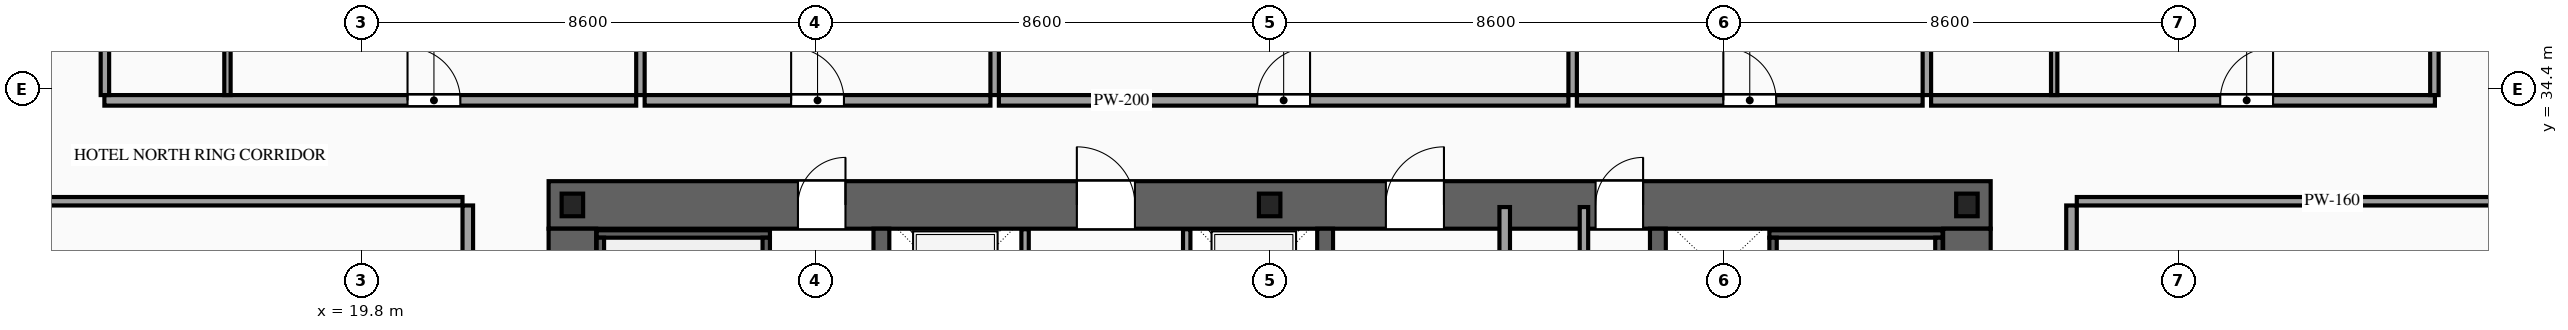
"""IFC4 building model, lengths in metres.
Left out: names, types, materials, properties, quantities, classifications, styles, units other than length and angle.
Written with IfcOpenShell. Run it as: python <this file> out.ifc"""

import sys

from ifc_helpers import new_model, si_unit, direction, frame, frame_2d, origin, origin_2d, place, context, subcontext, project, spatial, rectangle, i_section, extrude, source, transform, mapped, element, fill, save


model = new_model("IFC4")
c1 = context("Model", 3, precision=1e-05, world=origin(), true_north=direction((0.0, 1.0)))
c2 = subcontext(c1, "Body", "Model", "MODEL_VIEW")
j1 = project(units=[si_unit("LENGTHUNIT", "METRE"), si_unit("PLANEANGLEUNIT", "RADIAN")], contexts=[c1])
p1 = place(None, origin())
s1 = spatial("IfcSite", under=j1, at=p1, CompositionType="ELEMENT")
p2 = place(p1, origin())
s2 = spatial("IfcBuilding", under=s1, at=p2, CompositionType="ELEMENT")
p3 = place(p2, frame((0.0, 0.0, 60.4)))
s3 = spatial("IfcBuildingStorey", under=s2, at=p3, CompositionType="ELEMENT", Elevation=60.4)
p4 = place(p3, frame((23.35, 32.2, 0.0), z_axis=(0.0, 0.0, 1.0), x_axis=(1.0, 0.0, 0.0)))
e1 = element("IfcWall", 1, at=p4, inside=s3, PredefinedType="SHEAR", context=c2, shape_type="SweptSolid", body=[
    extrude(rectangle(XDim=27.3, YDim=0.9, at=frame_2d((13.65, 0.0))), origin(), (0.0, 0.0, 1.0), 3.6),
])
p5 = place(p4, frame((4.72, 0.0, 0.0)))
e2 = element("IfcOpeningElement", 2, at=p5, cuts=e1, PredefinedType="OPENING", context=c2, shape_type="SweptSolid", body=[
    extrude(rectangle(XDim=0.9, YDim=2.15, at=frame_2d((0.45, 1.075))), frame((0.0, 0.465, 0.0), z_axis=(0.0, -1.0, 0.0), x_axis=(1.0, 0.0, 0.0)), (0.0, 0.0, 1.0), 0.93),
])
p6 = place(p4, frame((10.0, 0.0, 0.0)))
e3 = element("IfcOpeningElement", 3, at=p6, cuts=e1, PredefinedType="OPENING", context=c2, shape_type="SweptSolid", body=[
    extrude(rectangle(XDim=1.1, YDim=2.2, at=frame_2d((0.55, 1.1))), frame((0.0, 0.465, 0.0), z_axis=(0.0, -1.0, 0.0), x_axis=(1.0, 0.0, 0.0)), (0.0, 0.0, 1.0), 0.93),
])
p7 = place(p4, frame((15.85, 0.0, 0.0)))
e4 = element("IfcOpeningElement", 4, at=p7, cuts=e1, PredefinedType="OPENING", context=c2, shape_type="SweptSolid", body=[
    extrude(rectangle(XDim=1.1, YDim=2.2, at=frame_2d((0.55, 1.1))), frame((0.0, 0.465, 0.0), z_axis=(0.0, -1.0, 0.0), x_axis=(1.0, 0.0, 0.0)), (0.0, 0.0, 1.0), 0.93),
])
p8 = place(p4, frame((19.82, 0.0, 0.0)))
e5 = element("IfcOpeningElement", 5, at=p8, cuts=e1, PredefinedType="OPENING", context=c2, shape_type="SweptSolid", body=[
    extrude(rectangle(XDim=0.9, YDim=2.15, at=frame_2d((0.45, 1.075))), frame((0.0, 0.465, 0.0), z_axis=(0.0, -1.0, 0.0), x_axis=(1.0, 0.0, 0.0)), (0.0, 0.0, 1.0), 0.93),
])
m1 = source(origin(), c2, "Body", "SweptSolid", [
    extrude(rectangle(XDim=11.9, YDim=0.9, at=frame_2d((5.95, 0.0))), origin(), (0.0, 0.0, 1.0), 3.6),
])
for number, where, z_axis, x_axis in (
    (6, (23.8, 19.85, 0.0), (0.0, 0.0, 1.0), (0.0, 1.0, 0.0)),
    (7, (50.2, 19.85, 0.0), (0.0, 0.0, 1.0), (0.0, 1.0, 0.0)),
):
    element("IfcWall", number, at=place(p3, frame(where, z_axis=z_axis, x_axis=x_axis)), inside=s3, PredefinedType="SHEAR", context=c2, shape_type="MappedRepresentation", body=[
        mapped(m1, transform((0.0, 0.0, 0.0), scale=1.0)),
    ])
m2 = source(origin(), c2, "Body", "SweptSolid", [
    extrude(rectangle(XDim=11.9, YDim=0.3, at=frame_2d((5.95, 0.0))), origin(), (0.0, 0.0, 1.0), 3.6),
])
for number, where, z_axis, x_axis in (
    (8, (29.65, 19.85, 0.0), (0.0, 0.0, 1.0), (0.0, 1.0, 0.0)),
    (9, (38.05, 19.85, 0.0), (0.0, 0.0, 1.0), (0.0, 1.0, 0.0)),
    (10, (44.35, 19.85, 0.0), (0.0, 0.0, 1.0), (0.0, 1.0, 0.0)),
):
    element("IfcWall", number, at=place(p3, frame(where, z_axis=z_axis, x_axis=x_axis)), inside=s3, PredefinedType="SOLIDWALL", context=c2, shape_type="MappedRepresentation", body=[
        mapped(m2, transform((0.0, 0.0, 0.0), scale=1.0)),
    ])
m3 = source(origin(), c2, "Body", "SweptSolid", [
    extrude(i_section(OverallWidth=0.407, OverallDepth=0.428, WebThickness=0.02, FlangeThickness=0.035, at=origin_2d()), origin(), (0.0, 0.0, 1.0), 3.6),
])
for number, where, z_axis, x_axis in (
    (11, (23.8, 32.2, 0.0), (0.0, 0.0, 1.0), (1.0, 0.0, 0.0)),
    (12, (37.0, 32.2, 0.0), (0.0, 0.0, 1.0), (1.0, 0.0, 0.0)),
    (13, (50.2, 32.2, 0.0), (0.0, 0.0, 1.0), (1.0, 0.0, 0.0)),
):
    element("IfcColumn", number, at=place(p3, frame(where, z_axis=z_axis, x_axis=x_axis)), inside=s3, PredefinedType="COLUMN", context=c2, shape_type="MappedRepresentation", body=[
        mapped(m3, transform((0.0, 0.0, 0.0), scale=1.0)),
    ])
p9 = place(p3, frame((32.37, 29.4, 0.0), z_axis=(0.0, 0.0, 1.0), x_axis=(0.0, 1.0, 0.0)))
e14 = element("IfcWall", 14, at=p9, inside=s3, PredefinedType="SOLIDWALL", context=c2, shape_type="SweptSolid", body=[
    extrude(rectangle(XDim=2.34, YDim=0.14, at=frame_2d((1.17, 0.0))), origin(), (0.0, 0.0, 1.0), 3.38),
])
p10 = place(p9, frame((0.62, 0.0, 0.0)))
e15 = element("IfcOpeningElement", 15, at=p10, cuts=e14, PredefinedType="OPENING", context=c2, shape_type="SweptSolid", body=[
    extrude(rectangle(XDim=1.1, YDim=2.2, at=frame_2d((0.55, 1.1))), frame((0.0, 0.085, 0.0), z_axis=(0.0, -1.0, 0.0), x_axis=(1.0, 0.0, 0.0)), (0.0, 0.0, 1.0), 0.17),
])
p11 = place(p3, frame((35.43, 29.4, 0.0), z_axis=(0.0, 0.0, 1.0), x_axis=(0.0, 1.0, 0.0)))
e16 = element("IfcWall", 16, at=p11, inside=s3, PredefinedType="SOLIDWALL", context=c2, shape_type="SweptSolid", body=[
    extrude(rectangle(XDim=2.34, YDim=0.14, at=frame_2d((1.17, 0.0))), origin(), (0.0, 0.0, 1.0), 3.38),
])
p12 = place(p11, frame((0.62, 0.0, 0.0)))
e17 = element("IfcOpeningElement", 17, at=p12, cuts=e16, PredefinedType="OPENING", context=c2, shape_type="SweptSolid", body=[
    extrude(rectangle(XDim=1.1, YDim=2.2, at=frame_2d((0.55, 1.1))), frame((0.0, 0.085, 0.0), z_axis=(0.0, -1.0, 0.0), x_axis=(1.0, 0.0, 0.0)), (0.0, 0.0, 1.0), 0.17),
])
m4 = source(origin(), c2, "Body", "SweptSolid", [
    extrude(rectangle(XDim=3.28, YDim=0.14, at=frame_2d((1.64, 0.0))), origin(), (0.0, 0.0, 1.0), 3.38),
])
p13 = place(p3, frame((24.26, 31.65, 0.0), z_axis=(0.0, 0.0, 1.0), x_axis=(1.0, 0.0, 0.0)))
e18 = element("IfcWall", 18, at=p13, inside=s3, PredefinedType="SOLIDWALL", context=c2, shape_type="MappedRepresentation", body=[
    mapped(m4, transform((0.0, 0.0, 0.0), scale=1.0)),
])
m5 = source(origin(), c2, "Body", "SweptSolid", [
    extrude(rectangle(XDim=8.94, YDim=0.14, at=frame_2d((4.47, 0.0))), origin(), (0.0, 0.0, 1.0), 3.38),
])
for number, where, z_axis, x_axis in (
    (19, (24.33, 22.64, 0.0), (0.0, 0.0, 1.0), (0.0, 1.0, 0.0)),
    (20, (27.47, 22.64, 0.0), (0.0, 0.0, 1.0), (0.0, 1.0, 0.0)),
):
    element("IfcWall", number, at=place(p3, frame(where, z_axis=z_axis, x_axis=x_axis)), inside=s3, PredefinedType="SOLIDWALL", context=c2, shape_type="MappedRepresentation", body=[
        mapped(m5, transform((0.0, 0.0, 0.0), scale=1.0)),
    ])
p14 = place(p3, frame((46.46, 31.65, 0.0), z_axis=(0.0, 0.0, 1.0), x_axis=(1.0, 0.0, 0.0)))
e21 = element("IfcWall", 21, at=p14, inside=s3, PredefinedType="SOLIDWALL", context=c2, shape_type="MappedRepresentation", body=[
    mapped(m4, transform((0.0, 0.0, 0.0), scale=1.0)),
])
for number, where, z_axis, x_axis in (
    (22, (46.53, 22.64, 0.0), (0.0, 0.0, 1.0), (0.0, 1.0, 0.0)),
    (23, (49.67, 22.64, 0.0), (0.0, 0.0, 1.0), (0.0, 1.0, 0.0)),
):
    element("IfcWall", number, at=place(p3, frame(where, z_axis=z_axis, x_axis=x_axis)), inside=s3, PredefinedType="SOLIDWALL", context=c2, shape_type="MappedRepresentation", body=[
        mapped(m5, transform((0.0, 0.0, 0.0), scale=1.0)),
    ])
m6 = source(origin(), c2, "Body", "SweptSolid", [
    extrude(rectangle(XDim=12.72, YDim=0.2, at=frame_2d((6.36, 0.0))), origin(), (0.0, 0.0, 1.0), 3.38),
])
p15 = place(p3, frame((41.45, 19.44, 0.0), z_axis=(0.0, 0.0, 1.0), x_axis=(0.0, 1.0, 0.0)))
e24 = element("IfcWall", 24, at=p15, inside=s3, PredefinedType="PARTITIONING", context=c2, shape_type="MappedRepresentation", body=[
    mapped(m6, transform((0.0, 0.0, 0.0), scale=1.0)),
])
m7 = source(origin(), c2, "Body", "SweptSolid", [
    extrude(rectangle(XDim=10.72, YDim=0.16, at=frame_2d((5.36, 0.0))), origin(), (0.0, 0.0, 1.0), 3.38),
])
p16 = place(p3, frame((42.95, 21.44, 0.0), z_axis=(0.0, 0.0, 1.0), x_axis=(0.0, 1.0, 0.0)))
e25 = element("IfcWall", 25, at=p16, inside=s3, PredefinedType="PARTITIONING", context=c2, shape_type="MappedRepresentation", body=[
    mapped(m7, transform((0.0, 0.0, 0.0), scale=1.0)),
])
p17 = place(p3, frame((14.94, 34.18, 0.0), z_axis=(0.0, 0.0, 1.0), x_axis=(1.0, 0.0, 0.0)))
e26 = element("IfcWall", 26, at=p17, inside=s3, PredefinedType="PARTITIONING", context=c2, shape_type="SweptSolid", body=[
    extrude(rectangle(XDim=10.068, YDim=0.2, at=frame_2d((5.034, 0.0))), origin(), (0.0, 0.0, 1.0), 3.38),
])
p18 = place(p17, frame((5.739, 0.0, 0.0)))
e27 = element("IfcOpeningElement", 27, at=p18, cuts=e26, PredefinedType="OPENING", context=c2, shape_type="SweptSolid", body=[
    extrude(rectangle(XDim=1.0, YDim=2.2, at=frame_2d((0.5, 1.1))), frame((0.0, 0.115, 0.0), z_axis=(0.0, -1.0, 0.0), x_axis=(1.0, 0.0, 0.0)), (0.0, 0.0, 1.0), 0.23),
])
m8 = source(origin(), c2, "Body", "SweptSolid", [
    extrude(rectangle(XDim=16.47, YDim=0.16, at=frame_2d((8.235, 0.0))), origin(), (0.0, 0.0, 1.0), 3.38),
])
p19 = place(p3, frame((25.088, 34.28, 0.0), z_axis=(0.0, 0.0, 1.0), x_axis=(0.0, 1.0, 0.0)))
e28 = element("IfcWall", 28, at=p19, inside=s3, PredefinedType="PARTITIONING", context=c2, shape_type="MappedRepresentation", body=[
    mapped(m8, transform((0.0, 0.0, 0.0), scale=1.0)),
])
m9 = source(origin(), c2, "Body", "SweptSolid", [
    extrude(rectangle(XDim=2.42, YDim=0.12, at=frame_2d((1.21, 0.0))), origin(), (0.0, 0.0, 1.0), 3.38),
])
p20 = place(p3, frame((17.27, 34.28, 0.0), z_axis=(0.0, 0.0, 1.0), x_axis=(0.0, 1.0, 0.0)))
e29 = element("IfcWall", 29, at=p20, inside=s3, PredefinedType="PARTITIONING", context=c2, shape_type="MappedRepresentation", body=[
    mapped(m9, transform((0.0, 0.0, 0.0), scale=1.0)),
])
p21 = place(p3, frame((25.168, 34.18, 0.0), z_axis=(0.0, 0.0, 1.0), x_axis=(1.0, 0.0, 0.0)))
e30 = element("IfcWall", 30, at=p21, inside=s3, PredefinedType="PARTITIONING", context=c2, shape_type="SweptSolid", body=[
    extrude(rectangle(XDim=6.546, YDim=0.2, at=frame_2d((3.273, 0.0))), origin(), (0.0, 0.0, 1.0), 3.38),
])
p22 = place(p21, frame((2.773, 0.0, 0.0)))
e31 = element("IfcOpeningElement", 31, at=p22, cuts=e30, PredefinedType="OPENING", context=c2, shape_type="SweptSolid", body=[
    extrude(rectangle(XDim=1.0, YDim=2.2, at=frame_2d((0.5, 1.1))), frame((0.0, 0.115, 0.0), z_axis=(0.0, -1.0, 0.0), x_axis=(1.0, 0.0, 0.0)), (0.0, 0.0, 1.0), 0.23),
])
p23 = place(p3, frame((31.794, 34.28, 0.0), z_axis=(0.0, 0.0, 1.0), x_axis=(0.0, 1.0, 0.0)))
e32 = element("IfcWall", 32, at=p23, inside=s3, PredefinedType="PARTITIONING", context=c2, shape_type="MappedRepresentation", body=[
    mapped(m8, transform((0.0, 0.0, 0.0), scale=1.0)),
])
p24 = place(p3, frame((31.874, 34.18, 0.0), z_axis=(0.0, 0.0, 1.0), x_axis=(1.0, 0.0, 0.0)))
e33 = element("IfcWall", 33, at=p24, inside=s3, PredefinedType="PARTITIONING", context=c2, shape_type="SweptSolid", body=[
    extrude(rectangle(XDim=10.782, YDim=0.2, at=frame_2d((5.391, 0.0))), origin(), (0.0, 0.0, 1.0), 3.38),
])
p25 = place(p24, frame((4.891, 0.0, 0.0)))
e34 = element("IfcOpeningElement", 34, at=p25, cuts=e33, PredefinedType="OPENING", context=c2, shape_type="SweptSolid", body=[
    extrude(rectangle(XDim=1.0, YDim=2.2, at=frame_2d((0.5, 1.1))), frame((0.0, 0.115, 0.0), z_axis=(0.0, -1.0, 0.0), x_axis=(1.0, 0.0, 0.0)), (0.0, 0.0, 1.0), 0.23),
])
p26 = place(p3, frame((42.736, 34.28, 0.0), z_axis=(0.0, 0.0, 1.0), x_axis=(0.0, 1.0, 0.0)))
e35 = element("IfcWall", 35, at=p26, inside=s3, PredefinedType="PARTITIONING", context=c2, shape_type="MappedRepresentation", body=[
    mapped(m8, transform((0.0, 0.0, 0.0), scale=1.0)),
])
p27 = place(p3, frame((42.816, 34.18, 0.0), z_axis=(0.0, 0.0, 1.0), x_axis=(1.0, 0.0, 0.0)))
e36 = element("IfcWall", 36, at=p27, inside=s3, PredefinedType="PARTITIONING", context=c2, shape_type="SweptSolid", body=[
    extrude(rectangle(XDim=6.546, YDim=0.2, at=frame_2d((3.273, 0.0))), origin(), (0.0, 0.0, 1.0), 3.38),
])
p28 = place(p27, frame((2.773, 0.0, 0.0)))
e37 = element("IfcOpeningElement", 37, at=p28, cuts=e36, PredefinedType="OPENING", context=c2, shape_type="SweptSolid", body=[
    extrude(rectangle(XDim=1.0, YDim=2.2, at=frame_2d((0.5, 1.1))), frame((0.0, 0.115, 0.0), z_axis=(0.0, -1.0, 0.0), x_axis=(1.0, 0.0, 0.0)), (0.0, 0.0, 1.0), 0.23),
])
p29 = place(p3, frame((49.442, 34.28, 0.0), z_axis=(0.0, 0.0, 1.0), x_axis=(0.0, 1.0, 0.0)))
e38 = element("IfcWall", 38, at=p29, inside=s3, PredefinedType="PARTITIONING", context=c2, shape_type="MappedRepresentation", body=[
    mapped(m8, transform((0.0, 0.0, 0.0), scale=1.0)),
])
p30 = place(p3, frame((49.522, 34.18, 0.0), z_axis=(0.0, 0.0, 1.0), x_axis=(1.0, 0.0, 0.0)))
e39 = element("IfcWall", 39, at=p30, inside=s3, PredefinedType="PARTITIONING", context=c2, shape_type="SweptSolid", body=[
    extrude(rectangle(XDim=9.538, YDim=0.2, at=frame_2d((4.769, 0.0))), origin(), (0.0, 0.0, 1.0), 3.38),
])
p31 = place(p30, frame((5.474, 0.0, 0.0)))
e40 = element("IfcOpeningElement", 40, at=p31, cuts=e39, PredefinedType="OPENING", context=c2, shape_type="SweptSolid", body=[
    extrude(rectangle(XDim=1.0, YDim=2.2, at=frame_2d((0.5, 1.1))), frame((0.0, 0.115, 0.0), z_axis=(0.0, -1.0, 0.0), x_axis=(1.0, 0.0, 0.0)), (0.0, 0.0, 1.0), 0.23),
])
m10 = source(origin(), c2, "Body", "SweptSolid", [
    extrude(rectangle(XDim=16.32, YDim=0.16, at=frame_2d((8.16, 0.0))), origin(), (0.0, 0.0, 1.0), 3.38),
])
for number, where, z_axis, x_axis in (
    (41, (14.95, 34.28, 0.0), (0.0, 0.0, 1.0), (0.0, 1.0, 0.0)),
    (42, (59.05, 34.28, 0.0), (0.0, 0.0, 1.0), (0.0, 1.0, 0.0)),
):
    element("IfcWall", number, at=place(p3, frame(where, z_axis=z_axis, x_axis=x_axis)), inside=s3, PredefinedType="PARTITIONING", context=c2, shape_type="MappedRepresentation", body=[
        mapped(m10, transform((0.0, 0.0, 0.0), scale=1.0)),
    ])
p32 = place(p3, frame((51.852, 34.28, 0.0), z_axis=(0.0, 0.0, 1.0), x_axis=(0.0, 1.0, 0.0)))
e43 = element("IfcWall", 43, at=p32, inside=s3, PredefinedType="PARTITIONING", context=c2, shape_type="MappedRepresentation", body=[
    mapped(m9, transform((0.0, 0.0, 0.0), scale=1.0)),
])
p33 = place(p3, frame((21.82, 25.88, 0.0), z_axis=(0.0, 0.0, 1.0), x_axis=(0.0, 1.0, 0.0)))
e44 = element("IfcWall", 44, at=p33, inside=s3, PredefinedType="PARTITIONING", context=c2, shape_type="SweptSolid", body=[
    extrude(rectangle(XDim=6.31, YDim=0.2, at=frame_2d((3.155, 0.0))), origin(), (0.0, 0.0, 1.0), 3.38),
])
p34 = place(p33, frame((3.835, 0.0, 0.0)))
e45 = element("IfcOpeningElement", 45, at=p34, cuts=e44, PredefinedType="OPENING", context=c2, shape_type="SweptSolid", body=[
    extrude(rectangle(XDim=1.0, YDim=2.2, at=frame_2d((0.5, 1.1))), frame((0.0, 0.115, 0.0), z_axis=(0.0, -1.0, 0.0), x_axis=(1.0, 0.0, 0.0)), (0.0, 0.0, 1.0), 0.23),
])
m11 = source(origin(), c2, "Body", "SweptSolid", [
    extrude(rectangle(XDim=9.67, YDim=0.16, at=frame_2d((4.835, 0.0))), origin(), (0.0, 0.0, 1.0), 2.875),
])
p35 = place(p3, frame((12.05, 32.27, 0.0), z_axis=(0.0, 0.0, 1.0), x_axis=(1.0, 0.0, 0.0)))
e46 = element("IfcWall", 46, at=p35, inside=s3, PredefinedType="PARTITIONING", context=c2, shape_type="MappedRepresentation", body=[
    mapped(m11, transform((0.0, 0.0, 0.0), scale=1.0)),
])
p36 = place(p3, frame((52.18, 25.88, 0.0), z_axis=(0.0, 0.0, 1.0), x_axis=(0.0, 1.0, 0.0)))
e47 = element("IfcWall", 47, at=p36, inside=s3, PredefinedType="PARTITIONING", context=c2, shape_type="SweptSolid", body=[
    extrude(rectangle(XDim=6.31, YDim=0.2, at=frame_2d((3.155, 0.0))), origin(), (0.0, 0.0, 1.0), 3.38),
])
p37 = place(p36, frame((3.835, 0.0, 0.0)))
e48 = element("IfcOpeningElement", 48, at=p37, cuts=e47, PredefinedType="OPENING", context=c2, shape_type="SweptSolid", body=[
    extrude(rectangle(XDim=1.0, YDim=2.2, at=frame_2d((0.5, 1.1))), frame((0.0, 0.115, 0.0), z_axis=(0.0, -1.0, 0.0), x_axis=(1.0, 0.0, 0.0)), (0.0, 0.0, 1.0), 0.23),
])
p38 = place(p3, frame((52.28, 32.27, 0.0), z_axis=(0.0, 0.0, 1.0), x_axis=(1.0, 0.0, 0.0)))
e49 = element("IfcWall", 49, at=p38, inside=s3, PredefinedType="PARTITIONING", context=c2, shape_type="MappedRepresentation", body=[
    mapped(m11, transform((0.0, 0.0, 0.0), scale=1.0)),
])
m12 = source(origin(), c2, "Body", "SweptSolid", [
    extrude(rectangle(XDim=0.9, YDim=2.15, at=frame_2d((0.45, 1.075))), frame((0.0, 0.025, 0.0), z_axis=(0.0, -1.0, 0.0), x_axis=(1.0, 0.0, 0.0)), (0.0, 0.0, 1.0), 0.05),
])
p39 = place(p5, origin())
e50 = element("IfcDoor", 50, at=p39, inside=s3, OperationType="SINGLE_SWING_RIGHT", PredefinedType="DOOR", context=c2, shape_type="MappedRepresentation", body=[
    mapped(m12, transform((0.0, 0.0, 0.0), scale=1.0)),
])
fill(e2, e50)
m13 = source(origin(), c2, "Body", "SweptSolid", [
    extrude(rectangle(XDim=1.1, YDim=2.2, at=frame_2d((0.55, 1.1))), frame((0.0, 0.025, 0.0), z_axis=(0.0, -1.0, 0.0), x_axis=(1.0, 0.0, 0.0)), (0.0, 0.0, 1.0), 0.05),
])
p40 = place(p6, origin())
e51 = element("IfcDoor", 51, at=p40, inside=s3, OperationType="SINGLE_SWING_LEFT", PredefinedType="DOOR", context=c2, shape_type="MappedRepresentation", body=[
    mapped(m13, transform((0.0, 0.0, 0.0), scale=1.0)),
])
fill(e3, e51)
p41 = place(p7, origin())
e52 = element("IfcDoor", 52, at=p41, inside=s3, OperationType="SINGLE_SWING_RIGHT", PredefinedType="DOOR", context=c2, shape_type="MappedRepresentation", body=[
    mapped(m13, transform((0.0, 0.0, 0.0), scale=1.0)),
])
fill(e4, e52)
p42 = place(p8, origin())
e53 = element("IfcDoor", 53, at=p42, inside=s3, OperationType="SINGLE_SWING_RIGHT", PredefinedType="DOOR", context=c2, shape_type="MappedRepresentation", body=[
    mapped(m12, transform((0.0, 0.0, 0.0), scale=1.0)),
])
fill(e5, e53)
m14 = source(origin(), c2, "Body", "SweptSolid", [
    extrude(rectangle(XDim=1.0, YDim=2.2, at=frame_2d((0.5, 1.1))), frame((0.0, 0.025, 0.0), z_axis=(0.0, -1.0, 0.0), x_axis=(1.0, 0.0, 0.0)), (0.0, 0.0, 1.0), 0.05),
])
p43 = place(p18, origin())
e54 = element("IfcDoor", 54, at=p43, inside=s3, OperationType="SINGLE_SWING_LEFT", PredefinedType="DOOR", context=c2, shape_type="MappedRepresentation", body=[
    mapped(m14, transform((0.0, 0.0, 0.0), scale=1.0)),
])
fill(e27, e54)
p44 = place(p22, origin())
e55 = element("IfcDoor", 55, at=p44, inside=s3, OperationType="SINGLE_SWING_LEFT", PredefinedType="DOOR", context=c2, shape_type="MappedRepresentation", body=[
    mapped(m14, transform((0.0, 0.0, 0.0), scale=1.0)),
])
fill(e31, e55)
p45 = place(p25, origin())
e56 = element("IfcDoor", 56, at=p45, inside=s3, OperationType="SINGLE_SWING_RIGHT", PredefinedType="DOOR", context=c2, shape_type="MappedRepresentation", body=[
    mapped(m14, transform((0.0, 0.0, 0.0), scale=1.0)),
])
fill(e34, e56)
p46 = place(p28, origin())
e57 = element("IfcDoor", 57, at=p46, inside=s3, OperationType="SINGLE_SWING_LEFT", PredefinedType="DOOR", context=c2, shape_type="MappedRepresentation", body=[
    mapped(m14, transform((0.0, 0.0, 0.0), scale=1.0)),
])
fill(e37, e57)
p47 = place(p31, origin())
e58 = element("IfcDoor", 58, at=p47, inside=s3, OperationType="SINGLE_SWING_RIGHT", PredefinedType="DOOR", context=c2, shape_type="MappedRepresentation", body=[
    mapped(m14, transform((0.0, 0.0, 0.0), scale=1.0)),
])
fill(e40, e58)
save(model, sys.argv[1])
